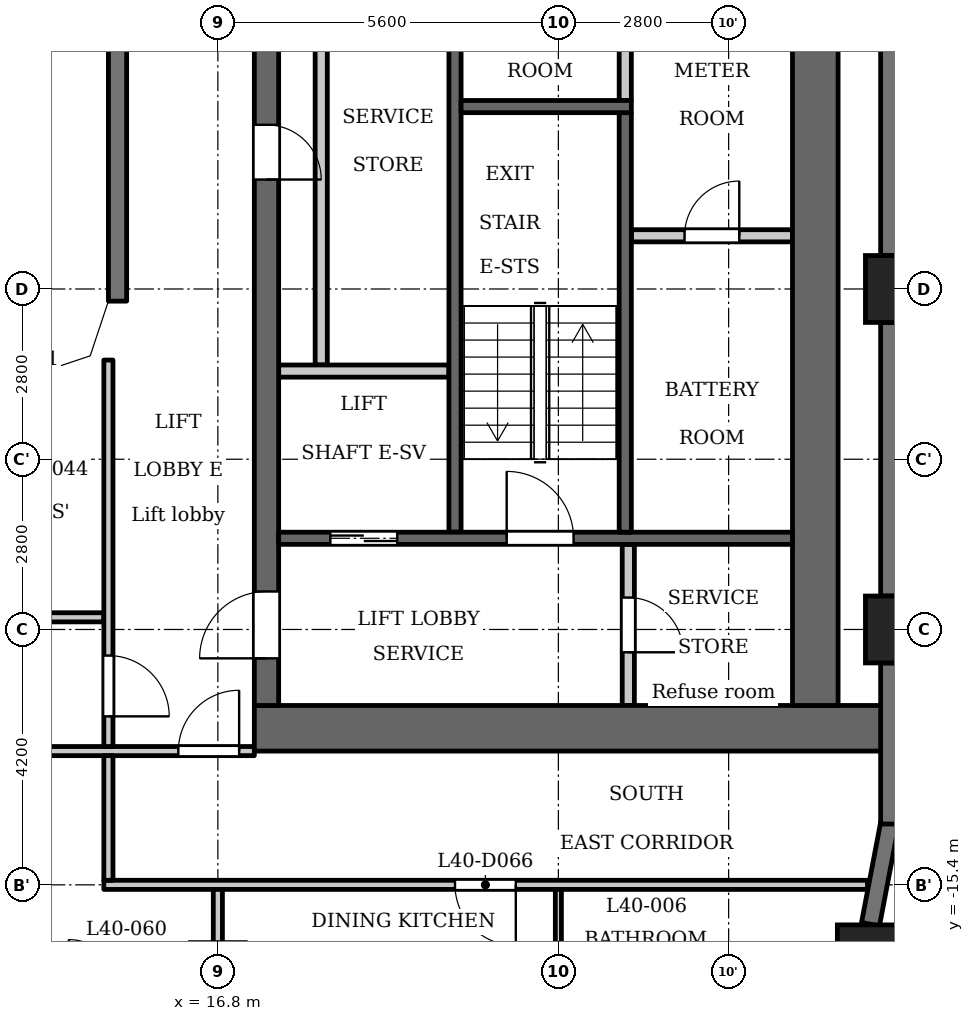
"""IFC4 building model, lengths in metres.
Left out: names, types, materials, properties, quantities, classifications, styles, units other than length and angle.
Written with IfcOpenShell. Run it as: python <this file> out.ifc"""

import sys

from ifc_helpers import new_model, si_unit, direction, frame, frame_2d, origin, origin_2d, place, context, subcontext, project, spatial, polyline, rectangle, outline, extrude, element, fill, save


model = new_model("IFC4")
c1 = context("Model", 3, precision=1e-05, world=origin(), true_north=direction((0.0, 1.0)))
c2 = subcontext(c1, "Body", "Model", "MODEL_VIEW")
j1 = project(units=[si_unit("LENGTHUNIT", "METRE"), si_unit("PLANEANGLEUNIT", "RADIAN")], contexts=[c1])
p1 = place(None, origin())
s1 = spatial("IfcSite", under=j1, at=p1, CompositionType="ELEMENT")
p2 = place(p1, origin())
s2 = spatial("IfcBuilding", under=s1, at=p2, CompositionType="ELEMENT")
p3 = place(p2, frame((0.0, 0.0, 157.1)))
s3 = spatial("IfcBuildingStorey", under=s2, at=p3, CompositionType="ELEMENT", Elevation=157.1)
for number, where, z_axis, x_axis in (
    (1, (27.538, -16.609, 0.0), (0.0, 0.0, 1.0), (1.0, 0.0, 0.0)),
    (2, (28.0, -11.2, 0.0), (0.0, 0.0, 1.0), (1.0, 0.0, 0.0)),
    (3, (28.0, -5.6, 0.0), (0.0, 0.0, 1.0), (1.0, 0.0, 0.0)),
):
    element("IfcColumn", number, at=place(p3, frame(where, z_axis=z_axis, x_axis=x_axis)), inside=s3, PredefinedType="COLUMN", context=c2, shape_type="SweptSolid", body=[
        extrude(rectangle(XDim=1.1, YDim=1.1, at=origin_2d()), origin(), (0.0, 0.0, 1.0), 3.5),
    ])
p4 = place(p3, frame((27.533, -16.048, 0.0), z_axis=(0.0, 0.0, 1.0), x_axis=(0.187302784601, 0.982302227871, 0.0)))
e4 = element("IfcWall", 4, at=p4, inside=s3, PredefinedType="SOLIDWALL", context=c2, shape_type="SweptSolid", body=[
    extrude(rectangle(XDim=1.706, YDim=0.3, at=frame_2d((0.853, 0.0))), origin(), (0.0, 0.0, 1.0), 2.45),
])
p5 = place(p3, frame((27.85, -14.4, 0.0), z_axis=(0.0, 0.0, 1.0), x_axis=(0.0, 1.0, 0.0)))
e5 = element("IfcWall", 5, at=p5, inside=s3, PredefinedType="SOLIDWALL", context=c2, shape_type="SweptSolid", body=[
    extrude(rectangle(XDim=2.65, YDim=0.3, at=frame_2d((1.325, 0.0))), origin(), (0.0, 0.0, 1.0), 2.45),
])
for number, where, z_axis, x_axis in (
    (6, (27.85, -10.65, 0.0), (0.0, 0.0, 1.0), (0.0, 1.0, 0.0)),
    (7, (27.85, -5.05, 0.0), (0.0, 0.0, 1.0), (0.0, 1.0, 0.0)),
):
    element("IfcWall", number, at=place(p3, frame(where, z_axis=z_axis, x_axis=x_axis)), inside=s3, PredefinedType="SOLIDWALL", context=c2, shape_type="SweptSolid", body=[
        extrude(rectangle(XDim=4.5, YDim=0.3, at=frame_2d((2.25, 0.0))), origin(), (0.0, 0.0, 1.0), 2.45),
    ])
p6 = place(p3, frame((15.15, 5.8, 0.0), z_axis=(0.0, 0.0, 1.0), x_axis=(0.0, -1.0, 0.0)))
e8 = element("IfcWall", 8, at=p6, inside=s3, PredefinedType="SOLIDWALL", context=c2, shape_type="SweptSolid", body=[
    extrude(rectangle(XDim=11.6, YDim=0.3, at=frame_2d((5.8, 0.0))), origin(), (0.0, 0.0, 1.0), 3.2),
])
p7 = place(p3, frame((23.5, -2.5, 0.0), z_axis=(0.0, 0.0, 1.0), x_axis=(0.0, 1.0, 0.0)))
e9 = element("IfcWall", 9, at=p7, inside=s3, PredefinedType="PARTITIONING", context=c2, shape_type="SweptSolid", body=[
    extrude(rectangle(XDim=2.65, YDim=0.2, at=frame_2d((1.325, 0.0))), origin(), (0.0, 0.0, 1.0), 3.2),
])
p8 = place(p3, frame((20.7, -9.6, 0.0), z_axis=(0.0, 0.0, 1.0), x_axis=(0.0, 1.0, 0.0)))
e10 = element("IfcWall", 10, at=p8, inside=s3, PredefinedType="SHEAR", context=c2, shape_type="SweptSolid", body=[
    extrude(rectangle(XDim=9.75, YDim=0.2, at=frame_2d((4.875, 0.0))), origin(), (0.0, 0.0, 1.0), 3.2),
])
p9 = place(p3, frame((17.4, -12.825, 0.0), z_axis=(0.0, 0.0, 1.0), x_axis=(1.0, 0.0, 0.0)))
e11 = element("IfcWall", 11, at=p9, inside=s3, PredefinedType="SHEAR", context=c2, shape_type="SweptSolid", body=[
    extrude(rectangle(XDim=10.4, YDim=0.75, at=frame_2d((5.2, 0.0))), origin(), (0.0, 0.0, 1.0), 3.2),
])
p10 = place(p3, frame((18.5, -6.85, 0.0), z_axis=(0.0, 0.0, 1.0), x_axis=(0.0, 1.0, 0.0)))
e12 = element("IfcWall", 12, at=p10, inside=s3, PredefinedType="PARTITIONING", context=c2, shape_type="SweptSolid", body=[
    extrude(rectangle(XDim=7.0, YDim=0.2, at=frame_2d((3.5, 0.0))), origin(), (0.0, 0.0, 1.0), 3.2),
])
p11 = place(p3, frame((17.6, -12.45, 0.0), z_axis=(0.0, 0.0, 1.0), x_axis=(0.0, 1.0, 0.0)))
e13 = element("IfcWall", 13, at=p11, inside=s3, PredefinedType="SHEAR", context=c2, shape_type="SweptSolid", body=[
    extrude(rectangle(XDim=24.9, YDim=0.4, at=frame_2d((12.45, 0.0))), origin(), (0.0, 0.0, 1.0), 3.2),
])
p12 = place(p11, frame((8.65, 0.0, 0.0)))
e14 = element("IfcOpeningElement", 14, at=p12, cuts=e13, PredefinedType="OPENING", context=c2, shape_type="SweptSolid", body=[
    extrude(rectangle(XDim=0.9, YDim=2.1, at=frame_2d((0.45, 1.05))), frame((0.0, 0.21, 0.0), z_axis=(0.0, -1.0, 0.0), x_axis=(1.0, 0.0, 0.0)), (0.0, 0.0, 1.0), 0.42),
])
p13 = place(p11, frame((15.6, 0.0, 0.0)))
e15 = element("IfcOpeningElement", 15, at=p13, cuts=e13, PredefinedType="OPENING", context=c2, shape_type="SweptSolid", body=[
    extrude(rectangle(XDim=1.1, YDim=2.1, at=frame_2d((0.55, 1.05))), frame((0.0, 0.21, 0.0), z_axis=(0.0, -1.0, 0.0), x_axis=(1.0, 0.0, 0.0)), (0.0, 0.0, 1.0), 0.42),
])
p14 = place(p11, frame((18.0, 0.0, 0.0)))
e16 = element("IfcOpeningElement", 16, at=p14, cuts=e13, PredefinedType="OPENING", context=c2, shape_type="SweptSolid", body=[
    extrude(rectangle(XDim=1.1, YDim=2.1, at=frame_2d((0.55, 1.05))), frame((0.0, 0.21, 0.0), z_axis=(0.0, -1.0, 0.0), x_axis=(1.0, 0.0, 0.0)), (0.0, 0.0, 1.0), 0.42),
])
p15 = place(p11, frame((23.025, 0.0, 0.0)))
e17 = element("IfcOpeningElement", 17, at=p15, cuts=e13, PredefinedType="OPENING", context=c2, shape_type="SweptSolid", body=[
    extrude(rectangle(XDim=1.1, YDim=2.1, at=frame_2d((0.55, 1.05))), frame((0.0, 0.21, 0.0), z_axis=(0.0, -1.0, 0.0), x_axis=(1.0, 0.0, 0.0)), (0.0, 0.0, 1.0), 0.42),
])
p16 = place(p11, frame((0.775, 0.0, 0.0)))
e18 = element("IfcOpeningElement", 18, at=p16, cuts=e13, PredefinedType="OPENING", context=c2, shape_type="SweptSolid", body=[
    extrude(rectangle(XDim=1.1, YDim=2.1, at=frame_2d((0.55, 1.05))), frame((0.0, 0.21, 0.0), z_axis=(0.0, -1.0, 0.0), x_axis=(1.0, 0.0, 0.0)), (0.0, 0.0, 1.0), 0.42),
])
p17 = place(p11, frame((12.925, 0.0, 0.0)))
e19 = element("IfcOpeningElement", 19, at=p17, cuts=e13, PredefinedType="OPENING", context=c2, shape_type="SweptSolid", body=[
    extrude(rectangle(XDim=1.8, YDim=2.1, at=frame_2d((0.9, 1.05))), frame((0.0, 0.21, 0.0), z_axis=(0.0, -1.0, 0.0), x_axis=(1.0, 0.0, 0.0)), (0.0, 0.0, 1.0), 0.42),
])
p18 = place(p3, frame((26.625, -12.45, 0.0), z_axis=(0.0, 0.0, 1.0), x_axis=(0.0, 1.0, 0.0)))
e20 = element("IfcWall", 20, at=p18, inside=s3, PredefinedType="SHEAR", context=c2, shape_type="SweptSolid", body=[
    extrude(rectangle(XDim=24.9, YDim=0.75, at=frame_2d((12.45, 0.0))), origin(), (0.0, 0.0, 1.0), 3.2),
])
p19 = place(p3, frame((23.55, -12.45, 0.0), z_axis=(0.0, 0.0, 1.0), x_axis=(0.0, 1.0, 0.0)))
e21 = element("IfcWall", 21, at=p19, inside=s3, PredefinedType="PARTITIONING", context=c2, shape_type="SweptSolid", body=[
    extrude(rectangle(XDim=2.65, YDim=0.2, at=frame_2d((1.325, 0.0))), origin(), (0.0, 0.0, 1.0), 3.2),
])
p20 = place(p19, frame((0.875, 0.0, 0.0)))
e22 = element("IfcOpeningElement", 22, at=p20, cuts=e21, PredefinedType="OPENING", context=c2, shape_type="SweptSolid", body=[
    extrude(rectangle(XDim=0.9, YDim=2.1, at=frame_2d((0.45, 1.05))), frame((0.0, 0.11, 0.0), z_axis=(0.0, -1.0, 0.0), x_axis=(1.0, 0.0, 0.0)), (0.0, 0.0, 1.0), 0.22),
])
p21 = place(p3, frame((23.6, -4.725, 0.0), z_axis=(0.0, 0.0, 1.0), x_axis=(1.0, 0.0, 0.0)))
e23 = element("IfcWall", 23, at=p21, inside=s3, PredefinedType="PARTITIONING", context=c2, shape_type="SweptSolid", body=[
    extrude(rectangle(XDim=2.65, YDim=0.2, at=frame_2d((1.325, 0.0))), origin(), (0.0, 0.0, 1.0), 3.2),
])
p22 = place(p21, frame((0.875, 0.0, 0.0)))
e24 = element("IfcOpeningElement", 24, at=p22, cuts=e23, PredefinedType="OPENING", context=c2, shape_type="SweptSolid", body=[
    extrude(rectangle(XDim=0.9, YDim=2.1, at=frame_2d((0.45, 1.05))), frame((0.0, 0.11, 0.0), z_axis=(0.0, -1.0, 0.0), x_axis=(1.0, 0.0, 0.0)), (0.0, 0.0, 1.0), 0.22),
])
p23 = place(p3, frame((17.8, -9.7, 0.0), z_axis=(0.0, 0.0, 1.0), x_axis=(1.0, 0.0, 0.0)))
e25 = element("IfcWall", 25, at=p23, inside=s3, PredefinedType="SHEAR", context=c2, shape_type="SweptSolid", body=[
    extrude(rectangle(XDim=8.45, YDim=0.2, at=frame_2d((4.225, 0.0))), origin(), (0.0, 0.0, 1.0), 3.2),
])
p24 = place(p23, frame((0.85, 0.0, 0.0)))
e26 = element("IfcOpeningElement", 26, at=p24, cuts=e25, PredefinedType="OPENING", context=c2, shape_type="SweptSolid", body=[
    extrude(rectangle(XDim=1.1, YDim=2.1, at=frame_2d((0.55, 1.05))), frame((0.0, 0.11, 0.0), z_axis=(0.0, -1.0, 0.0), x_axis=(1.0, 0.0, 0.0)), (0.0, 0.0, 1.0), 0.22),
])
p25 = place(p23, frame((3.75, 0.0, 0.0)))
e27 = element("IfcOpeningElement", 27, at=p25, cuts=e25, PredefinedType="OPENING", context=c2, shape_type="SweptSolid", body=[
    extrude(rectangle(XDim=1.1, YDim=2.1, at=frame_2d((0.55, 1.05))), frame((0.0, 0.11, 0.0), z_axis=(0.0, -1.0, 0.0), x_axis=(1.0, 0.0, 0.0)), (0.0, 0.0, 1.0), 0.22),
])
p26 = place(p3, frame((17.8, -6.95, 0.0), z_axis=(0.0, 0.0, 1.0), x_axis=(1.0, 0.0, 0.0)))
e28 = element("IfcWall", 28, at=p26, inside=s3, PredefinedType="PARTITIONING", context=c2, shape_type="SweptSolid", body=[
    extrude(rectangle(XDim=2.8, YDim=0.2, at=frame_2d((1.4, 0.0))), origin(), (0.0, 0.0, 1.0), 3.2),
])
p27 = place(p3, frame((23.5, -9.6, 0.0), z_axis=(0.0, 0.0, 1.0), x_axis=(0.0, 1.0, 0.0)))
e29 = element("IfcWall", 29, at=p27, inside=s3, PredefinedType="SHEAR", context=c2, shape_type="SweptSolid", body=[
    extrude(rectangle(XDim=6.9, YDim=0.2, at=frame_2d((3.45, 0.0))), origin(), (0.0, 0.0, 1.0), 3.2),
])
p28 = place(p3, frame((20.8, -2.6, 0.0), z_axis=(0.0, 0.0, 1.0), x_axis=(1.0, 0.0, 0.0)))
e30 = element("IfcWall", 30, at=p28, inside=s3, PredefinedType="SHEAR", context=c2, shape_type="SweptSolid", body=[
    extrude(rectangle(XDim=2.8, YDim=0.2, at=frame_2d((1.4, 0.0))), origin(), (0.0, 0.0, 1.0), 3.2),
])
p29 = place(p3, frame((14.925, -15.4, 0.0), z_axis=(0.0, 0.0, 1.0), x_axis=(1.0, 0.0, 0.0)))
e31 = element("IfcWall", 31, at=p29, inside=s3, PredefinedType="PARTITIONING", context=c2, shape_type="SweptSolid", body=[
    extrude(rectangle(XDim=12.559, YDim=0.15, at=frame_2d((6.279, 0.0))), origin(), (0.0, 0.0, 1.0), 3.2),
])
p30 = place(p29, frame((5.775, 0.0, 0.0)))
e32 = element("IfcOpeningElement", 32, at=p30, cuts=e31, PredefinedType="OPENING", context=c2, shape_type="SweptSolid", body=[
    extrude(rectangle(XDim=1.0, YDim=2.1, at=frame_2d((0.5, 1.05))), frame((0.0, 0.085, 0.0), z_axis=(0.0, -1.0, 0.0), x_axis=(1.0, 0.0, 0.0)), (0.0, 0.0, 1.0), 0.17),
])
p31 = place(p3, frame((-17.4, -13.2, 0.0), z_axis=(0.0, 0.0, 1.0), x_axis=(1.0, 0.0, 0.0)))
e33 = element("IfcWall", 33, at=p31, inside=s3, PredefinedType="PARTITIONING", context=c2, shape_type="SweptSolid", body=[
    extrude(rectangle(XDim=34.8, YDim=0.15, at=frame_2d((17.4, 0.0))), origin(), (0.0, 0.0, 1.0), 3.2),
])
p32 = place(p31, frame((0.15, 0.0, 0.0)))
e34 = element("IfcOpeningElement", 34, at=p32, cuts=e33, PredefinedType="OPENING", context=c2, shape_type="SweptSolid", body=[
    extrude(rectangle(XDim=1.0, YDim=2.1, at=frame_2d((0.5, 1.05))), frame((0.0, 0.085, 0.0), z_axis=(0.0, -1.0, 0.0), x_axis=(1.0, 0.0, 0.0)), (0.0, 0.0, 1.0), 0.17),
])
p33 = place(p31, frame((33.55, 0.0, 0.0)))
e35 = element("IfcOpeningElement", 35, at=p33, cuts=e33, PredefinedType="OPENING", context=c2, shape_type="SweptSolid", body=[
    extrude(rectangle(XDim=1.0, YDim=2.1, at=frame_2d((0.5, 1.05))), frame((0.0, 0.085, 0.0), z_axis=(0.0, -1.0, 0.0), x_axis=(1.0, 0.0, 0.0)), (0.0, 0.0, 1.0), 0.17),
])
p34 = place(p31, frame((3.5, 0.0, 0.0)))
e36 = element("IfcOpeningElement", 36, at=p34, cuts=e33, PredefinedType="OPENING", context=c2, shape_type="SweptSolid", body=[
    extrude(rectangle(XDim=1.0, YDim=2.1, at=frame_2d((0.5, 1.05))), frame((0.0, 0.085, 0.0), z_axis=(0.0, -1.0, 0.0), x_axis=(1.0, 0.0, 0.0)), (0.0, 0.0, 1.0), 0.17),
])
p35 = place(p31, frame((10.1, 0.0, 0.0)))
e37 = element("IfcOpeningElement", 37, at=p35, cuts=e33, PredefinedType="OPENING", context=c2, shape_type="SweptSolid", body=[
    extrude(rectangle(XDim=1.0, YDim=2.1, at=frame_2d((0.5, 1.05))), frame((0.0, 0.085, 0.0), z_axis=(0.0, -1.0, 0.0), x_axis=(1.0, 0.0, 0.0)), (0.0, 0.0, 1.0), 0.17),
])
p36 = place(p31, frame((15.7, 0.0, 0.0)))
e38 = element("IfcOpeningElement", 38, at=p36, cuts=e33, PredefinedType="OPENING", context=c2, shape_type="SweptSolid", body=[
    extrude(rectangle(XDim=1.0, YDim=2.1, at=frame_2d((0.5, 1.05))), frame((0.0, 0.085, 0.0), z_axis=(0.0, -1.0, 0.0), x_axis=(1.0, 0.0, 0.0)), (0.0, 0.0, 1.0), 0.17),
])
p37 = place(p31, frame((18.05, 0.0, 0.0)))
e39 = element("IfcOpeningElement", 39, at=p37, cuts=e33, PredefinedType="OPENING", context=c2, shape_type="SweptSolid", body=[
    extrude(rectangle(XDim=1.0, YDim=2.1, at=frame_2d((0.5, 1.05))), frame((0.0, 0.085, 0.0), z_axis=(0.0, -1.0, 0.0), x_axis=(1.0, 0.0, 0.0)), (0.0, 0.0, 1.0), 0.17),
])
p38 = place(p31, frame((26.9, 0.0, 0.0)))
e40 = element("IfcOpeningElement", 40, at=p38, cuts=e33, PredefinedType="OPENING", context=c2, shape_type="SweptSolid", body=[
    extrude(rectangle(XDim=1.0, YDim=2.1, at=frame_2d((0.5, 1.05))), frame((0.0, 0.085, 0.0), z_axis=(0.0, -1.0, 0.0), x_axis=(1.0, 0.0, 0.0)), (0.0, 0.0, 1.0), 0.17),
])
p39 = place(p3, frame((-14.925, -11.0, 0.0), z_axis=(0.0, 0.0, 1.0), x_axis=(1.0, 0.0, 0.0)))
e41 = element("IfcWall", 41, at=p39, inside=s3, PredefinedType="PARTITIONING", context=c2, shape_type="SweptSolid", body=[
    extrude(rectangle(XDim=29.85, YDim=0.15, at=frame_2d((14.925, 0.0))), origin(), (0.0, 0.0, 1.0), 3.2),
])
p40 = place(p39, frame((2.075, 0.0, 0.0)))
e42 = element("IfcOpeningElement", 42, at=p40, cuts=e41, PredefinedType="OPENING", context=c2, shape_type="SweptSolid", body=[
    extrude(rectangle(XDim=1.0, YDim=2.1, at=frame_2d((0.5, 1.05))), frame((0.0, 0.085, 0.0), z_axis=(0.0, -1.0, 0.0), x_axis=(1.0, 0.0, 0.0)), (0.0, 0.0, 1.0), 0.17),
])
p41 = place(p39, frame((4.425, 0.0, 0.0)))
e43 = element("IfcOpeningElement", 43, at=p41, cuts=e41, PredefinedType="OPENING", context=c2, shape_type="SweptSolid", body=[
    extrude(rectangle(XDim=1.0, YDim=2.1, at=frame_2d((0.5, 1.05))), frame((0.0, 0.085, 0.0), z_axis=(0.0, -1.0, 0.0), x_axis=(1.0, 0.0, 0.0)), (0.0, 0.0, 1.0), 0.17),
])
p42 = place(p39, frame((13.275, 0.0, 0.0)))
e44 = element("IfcOpeningElement", 44, at=p42, cuts=e41, PredefinedType="OPENING", context=c2, shape_type="SweptSolid", body=[
    extrude(rectangle(XDim=1.0, YDim=2.1, at=frame_2d((0.5, 1.05))), frame((0.0, 0.085, 0.0), z_axis=(0.0, -1.0, 0.0), x_axis=(1.0, 0.0, 0.0)), (0.0, 0.0, 1.0), 0.17),
])
p43 = place(p39, frame((15.625, 0.0, 0.0)))
e45 = element("IfcOpeningElement", 45, at=p43, cuts=e41, PredefinedType="OPENING", context=c2, shape_type="SweptSolid", body=[
    extrude(rectangle(XDim=1.0, YDim=2.1, at=frame_2d((0.5, 1.05))), frame((0.0, 0.085, 0.0), z_axis=(0.0, -1.0, 0.0), x_axis=(1.0, 0.0, 0.0)), (0.0, 0.0, 1.0), 0.17),
])
p44 = place(p39, frame((24.475, 0.0, 0.0)))
e46 = element("IfcOpeningElement", 46, at=p44, cuts=e41, PredefinedType="OPENING", context=c2, shape_type="SweptSolid", body=[
    extrude(rectangle(XDim=1.0, YDim=2.1, at=frame_2d((0.5, 1.05))), frame((0.0, 0.085, 0.0), z_axis=(0.0, -1.0, 0.0), x_axis=(1.0, 0.0, 0.0)), (0.0, 0.0, 1.0), 0.17),
])
p45 = place(p39, frame((26.774, 0.0, 0.0)))
e47 = element("IfcOpeningElement", 47, at=p45, cuts=e41, PredefinedType="OPENING", context=c2, shape_type="SweptSolid", body=[
    extrude(rectangle(XDim=1.0, YDim=2.1, at=frame_2d((0.5, 1.05))), frame((0.0, 0.085, 0.0), z_axis=(0.0, -1.0, 0.0), x_axis=(1.0, 0.0, 0.0)), (0.0, 0.0, 1.0), 0.17),
])
p46 = place(p3, frame((15.0, -15.325, 0.0), z_axis=(0.0, 0.0, 1.0), x_axis=(0.0, 1.0, 0.0)))
e48 = element("IfcWall", 48, at=p46, inside=s3, PredefinedType="PARTITIONING", context=c2, shape_type="SweptSolid", body=[
    extrude(rectangle(XDim=2.05, YDim=0.15, at=frame_2d((1.025, 0.0))), origin(), (0.0, 0.0, 1.0), 3.2),
])
p47 = place(p3, frame((15.0, -13.125, 0.0), z_axis=(0.0, 0.0, 1.0), x_axis=(0.0, 1.0, 0.0)))
e49 = element("IfcWall", 49, at=p47, inside=s3, PredefinedType="PARTITIONING", context=c2, shape_type="SweptSolid", body=[
    extrude(rectangle(XDim=6.356, YDim=0.15, at=frame_2d((3.178, 0.0))), origin(), (0.0, 0.0, 1.0), 3.2),
])
p48 = place(p47, frame((0.496, 0.0, 0.0)))
e50 = element("IfcOpeningElement", 50, at=p48, cuts=e49, PredefinedType="OPENING", context=c2, shape_type="SweptSolid", body=[
    extrude(rectangle(XDim=1.0, YDim=2.1, at=frame_2d((0.5, 1.05))), frame((0.0, 0.085, 0.0), z_axis=(0.0, -1.0, 0.0), x_axis=(1.0, 0.0, 0.0)), (0.0, 0.0, 1.0), 0.17),
])
p49 = place(p3, frame((16.8, -22.93, 0.0), z_axis=(0.0, 0.0, 1.0), x_axis=(0.0, 1.0, 0.0)))
e51 = element("IfcWall", 51, at=p49, inside=s3, PredefinedType="PARTITIONING", context=c2, shape_type="SweptSolid", body=[
    extrude(rectangle(XDim=7.455, YDim=0.15, at=frame_2d((3.728, 0.0))), origin(), (0.0, 0.0, 1.0), 3.2),
])
p50 = place(p3, frame((22.4, -17.75, 0.0), z_axis=(0.0, 0.0, 1.0), x_axis=(0.0, 1.0, 0.0)))
e52 = element("IfcWall", 52, at=p50, inside=s3, PredefinedType="PARTITIONING", context=c2, shape_type="SweptSolid", body=[
    extrude(rectangle(XDim=2.275, YDim=0.1, at=frame_2d((1.137, 0.0))), origin(), (0.0, 0.0, 1.0), 3.2),
])
p51 = place(p3, origin())
e53 = element("IfcWall", 53, at=p51, inside=s3, PredefinedType="SOLIDWALL", context=c2, shape_type="SweptSolid", body=[
    extrude(outline(polyline([(14.937, -6.937), (15.3, -5.849), (15.3, -5.8), (15.0, -5.8), (14.7, -6.7), (13.8, -7.0), (13.8, -7.3), (13.849, -7.3), (14.937, -6.937)])), origin(), (0.0, 0.0, 1.0), 3.2),
])
p52 = place(p24, origin())
e54 = element("IfcDoor", 54, at=p52, inside=s3, OperationType="DOUBLE_DOOR_SLIDING", PredefinedType="DOOR", context=c2, shape_type="SweptSolid", body=[
    extrude(rectangle(XDim=1.1, YDim=2.1, at=frame_2d((0.55, 1.05))), frame((0.0, 0.025, 0.0), z_axis=(0.0, -1.0, 0.0), x_axis=(1.0, 0.0, 0.0)), (0.0, 0.0, 1.0), 0.05),
])
fill(e26, e54)
p53 = place(p12, origin())
e55 = element("IfcDoor", 55, at=p53, inside=s3, OperationType="SINGLE_SWING_LEFT", PredefinedType="DOOR", context=c2, shape_type="SweptSolid", body=[
    extrude(rectangle(XDim=0.9, YDim=2.1, at=frame_2d((0.45, 1.05))), frame((0.0, 0.025, 0.0), z_axis=(0.0, -1.0, 0.0), x_axis=(1.0, 0.0, 0.0)), (0.0, 0.0, 1.0), 0.05),
])
fill(e14, e55)
p54 = place(p16, origin())
e56 = element("IfcDoor", 56, at=p54, inside=s3, OperationType="SINGLE_SWING_RIGHT", PredefinedType="DOOR", context=c2, shape_type="SweptSolid", body=[
    extrude(rectangle(XDim=1.1, YDim=2.1, at=frame_2d((0.55, 1.05))), frame((0.0, 0.025, 0.0), z_axis=(0.0, -1.0, 0.0), x_axis=(1.0, 0.0, 0.0)), (0.0, 0.0, 1.0), 0.05),
])
fill(e18, e56)
p55 = place(p20, origin())
e57 = element("IfcDoor", 57, at=p55, inside=s3, OperationType="SINGLE_SWING_LEFT", PredefinedType="DOOR", context=c2, shape_type="SweptSolid", body=[
    extrude(rectangle(XDim=0.9, YDim=2.1, at=frame_2d((0.45, 1.05))), frame((0.0, 0.025, 0.0), z_axis=(0.0, -1.0, 0.0), x_axis=(1.0, 0.0, 0.0)), (0.0, 0.0, 1.0), 0.05),
])
fill(e22, e57)
p56 = place(p25, origin())
e58 = element("IfcDoor", 58, at=p56, inside=s3, OperationType="SINGLE_SWING_RIGHT", PredefinedType="DOOR", context=c2, shape_type="SweptSolid", body=[
    extrude(rectangle(XDim=1.1, YDim=2.1, at=frame_2d((0.55, 1.05))), frame((0.0, 0.025, 0.0), z_axis=(0.0, -1.0, 0.0), x_axis=(1.0, 0.0, 0.0)), (0.0, 0.0, 1.0), 0.05),
])
fill(e27, e58)
p57 = place(p22, origin())
e59 = element("IfcDoor", 59, at=p57, inside=s3, OperationType="SINGLE_SWING_LEFT", PredefinedType="DOOR", context=c2, shape_type="SweptSolid", body=[
    extrude(rectangle(XDim=0.9, YDim=2.1, at=frame_2d((0.45, 1.05))), frame((0.0, 0.025, 0.0), z_axis=(0.0, -1.0, 0.0), x_axis=(1.0, 0.0, 0.0)), (0.0, 0.0, 1.0), 0.05),
])
fill(e24, e59)
p58 = place(p48, origin())
e60 = element("IfcDoor", 60, at=p58, inside=s3, OperationType="SINGLE_SWING_LEFT", PredefinedType="DOOR", context=c2, shape_type="SweptSolid", body=[
    extrude(rectangle(XDim=1.0, YDim=2.1, at=frame_2d((0.5, 1.05))), frame((0.0, 0.025, 0.0), z_axis=(0.0, -1.0, 0.0), x_axis=(1.0, 0.0, 0.0)), (0.0, 0.0, 1.0), 0.05),
])
fill(e50, e60)
p59 = place(p33, origin())
e61 = element("IfcDoor", 61, at=p59, inside=s3, OperationType="SINGLE_SWING_LEFT", PredefinedType="DOOR", context=c2, shape_type="SweptSolid", body=[
    extrude(rectangle(XDim=1.0, YDim=2.1, at=frame_2d((0.5, 1.05))), frame((0.0, 0.025, 0.0), z_axis=(0.0, -1.0, 0.0), x_axis=(1.0, 0.0, 0.0)), (0.0, 0.0, 1.0), 0.05),
])
fill(e35, e61)
p60 = place(p30, origin())
e62 = element("IfcDoor", 62, at=p60, inside=s3, OperationType="SINGLE_SWING_RIGHT", PredefinedType="DOOR", context=c2, shape_type="SweptSolid", body=[
    extrude(rectangle(XDim=1.0, YDim=2.1, at=frame_2d((0.5, 1.05))), frame((0.0, 0.025, 0.0), z_axis=(0.0, -1.0, 0.0), x_axis=(1.0, 0.0, 0.0)), (0.0, 0.0, 1.0), 0.05),
])
fill(e32, e62)
save(model, sys.argv[1])
